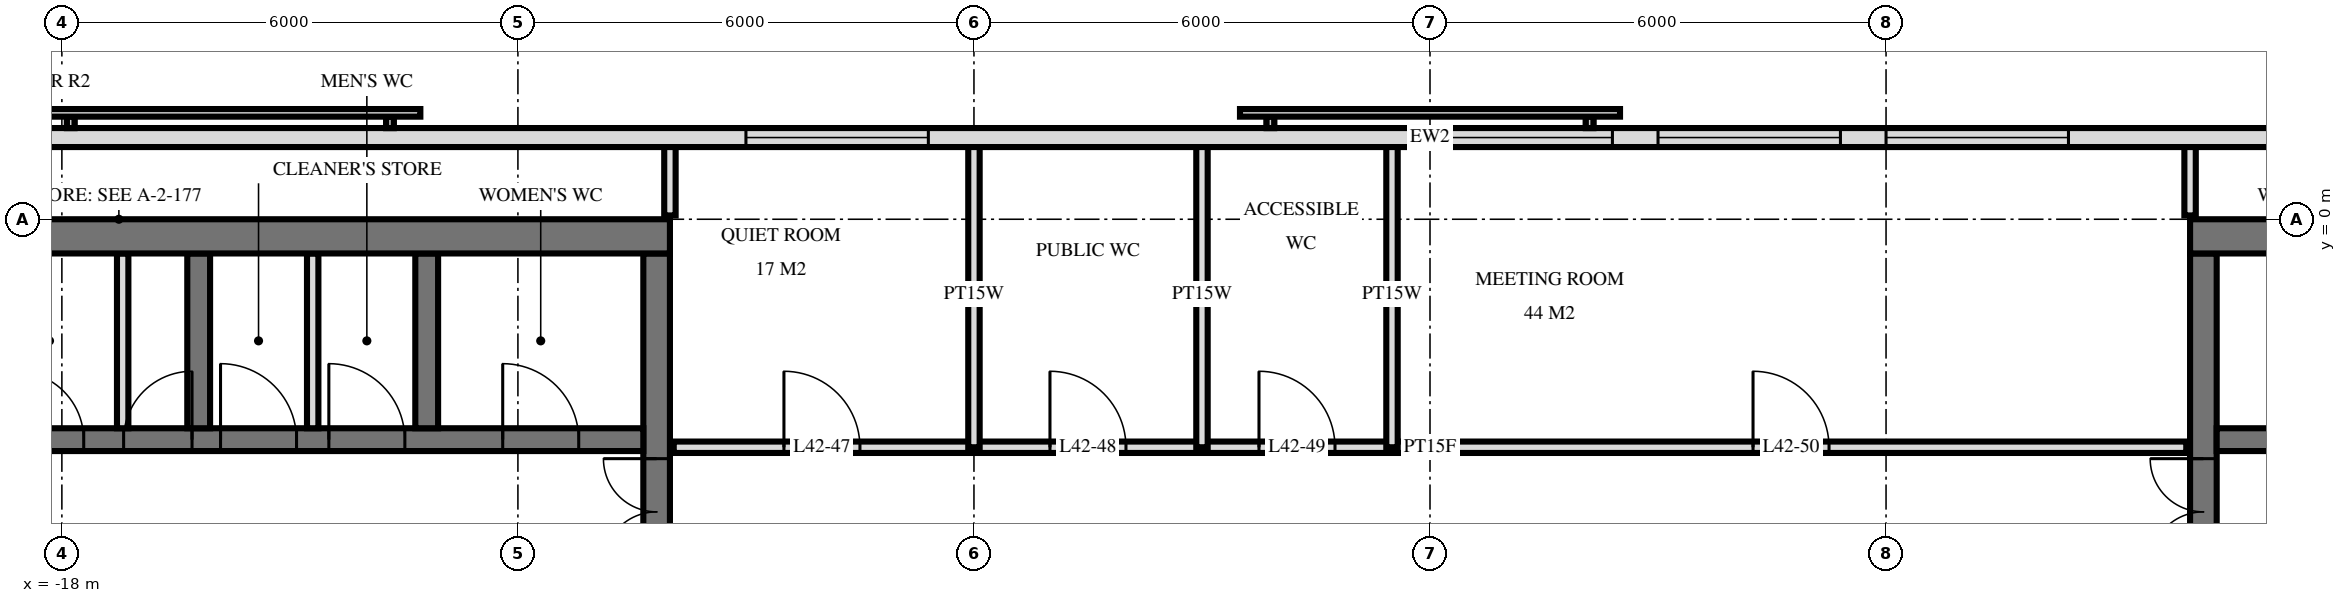
"""IFC4 building model, lengths in metres.
Left out: names, types, materials, properties, quantities, classifications, styles, units other than length and angle.
Written with IfcOpenShell. Run it as: python <this file> out.ifc"""

import sys

from ifc_helpers import new_model, si_unit, direction, frame, frame_2d, origin, place, context, subcontext, project, spatial, rectangle, extrude, element, fill, save


model = new_model("IFC4")
c1 = context("Model", 3, precision=1e-05, world=origin(), true_north=direction((0.0, 1.0)))
c2 = subcontext(c1, "Body", "Model", "MODEL_VIEW")
j1 = project(units=[si_unit("LENGTHUNIT", "METRE"), si_unit("PLANEANGLEUNIT", "RADIAN")], contexts=[c1])
p1 = place(None, origin())
s1 = spatial("IfcSite", under=j1, at=p1, CompositionType="ELEMENT")
p2 = place(p1, origin())
s2 = spatial("IfcBuilding", under=s1, at=p2, CompositionType="ELEMENT")
p3 = place(p2, frame((0.0, 0.0, 163.2)))
s3 = spatial("IfcBuildingStorey", under=s2, at=p3, CompositionType="ELEMENT", Elevation=163.2)
p4 = place(p3, frame((-24.5, -0.225, 0.0), z_axis=(0.0, 0.0, 1.0), x_axis=(1.0, 0.0, 0.0)))
e1 = element("IfcWall", 1, at=p4, inside=s3, PredefinedType="SHEAR", context=c2, shape_type="SweptSolid", body=[
    extrude(rectangle(XDim=14.5, YDim=0.45, at=frame_2d((7.25, 0.0))), origin(), (0.0, 0.0, 1.0), 3.6),
])
p5 = place(p3, frame((-10.175, -14.55, 0.0), z_axis=(0.0, 0.0, 1.0), x_axis=(0.0, 1.0, 0.0)))
e2 = element("IfcWall", 2, at=p5, inside=s3, PredefinedType="SHEAR", context=c2, shape_type="SweptSolid", body=[
    extrude(rectangle(XDim=14.1, YDim=0.35, at=frame_2d((7.05, 0.0))), origin(), (0.0, 0.0, 1.0), 3.6),
])
p6 = place(p5, frame((8.4, 0.0, 0.0)))
e3 = element("IfcOpeningElement", 3, at=p6, cuts=e2, PredefinedType="OPENING", context=c2, shape_type="SweptSolid", body=[
    extrude(rectangle(XDim=1.4, YDim=2.4, at=frame_2d((0.7, 1.2))), frame((0.0, 0.185, 0.0), z_axis=(0.0, -1.0, 0.0), x_axis=(1.0, 0.0, 0.0)), (0.0, 0.0, 1.0), 0.37),
])
p7 = place(p5, frame((10.0, 0.0, 0.0)))
e4 = element("IfcOpeningElement", 4, at=p7, cuts=e2, PredefinedType="OPENING", context=c2, shape_type="SweptSolid", body=[
    extrude(rectangle(XDim=1.4, YDim=2.4, at=frame_2d((0.7, 1.2))), frame((0.0, 0.185, 0.0), z_axis=(0.0, -1.0, 0.0), x_axis=(1.0, 0.0, 0.0)), (0.0, 0.0, 1.0), 0.37),
])
p8 = place(p5, frame((4.0, 0.0, 0.0)))
e5 = element("IfcOpeningElement", 5, at=p8, cuts=e2, PredefinedType="OPENING", context=c2, shape_type="SweptSolid", body=[
    extrude(rectangle(XDim=1.2, YDim=2.1, at=frame_2d((0.6, 1.05))), frame((0.0, 0.185, 0.0), z_axis=(0.0, -1.0, 0.0), x_axis=(1.0, 0.0, 0.0)), (0.0, 0.0, 1.0), 0.37),
])
p9 = place(p3, frame((-24.05, -2.9, 0.0), z_axis=(0.0, 0.0, 1.0), x_axis=(1.0, 0.0, 0.0)))
e6 = element("IfcWall", 6, at=p9, inside=s3, PredefinedType="SHEAR", context=c2, shape_type="SweptSolid", body=[
    extrude(rectangle(XDim=13.7, YDim=0.3, at=frame_2d((6.85, 0.0))), origin(), (0.0, 0.0, 1.0), 3.6),
])
p10 = place(p9, frame((0.55, 0.0, 0.0)))
e7 = element("IfcOpeningElement", 7, at=p10, cuts=e6, PredefinedType="OPENING", context=c2, shape_type="SweptSolid", body=[
    extrude(rectangle(XDim=1.1, YDim=2.1, at=frame_2d((0.55, 1.05))), frame((0.0, 0.16, 0.0), z_axis=(0.0, -1.0, 0.0), x_axis=(1.0, 0.0, 0.0)), (0.0, 0.0, 1.0), 0.32),
])
p11 = place(p9, frame((6.863, 0.0, 0.0)))
e8 = element("IfcOpeningElement", 8, at=p11, cuts=e6, PredefinedType="OPENING", context=c2, shape_type="SweptSolid", body=[
    extrude(rectangle(XDim=0.9, YDim=2.1, at=frame_2d((0.45, 1.05))), frame((0.0, 0.16, 0.0), z_axis=(0.0, -1.0, 0.0), x_axis=(1.0, 0.0, 0.0)), (0.0, 0.0, 1.0), 0.32),
])
p12 = place(p9, frame((5.438, 0.0, 0.0)))
e9 = element("IfcOpeningElement", 9, at=p12, cuts=e6, PredefinedType="OPENING", context=c2, shape_type="SweptSolid", body=[
    extrude(rectangle(XDim=0.9, YDim=2.1, at=frame_2d((0.45, 1.05))), frame((0.0, 0.16, 0.0), z_axis=(0.0, -1.0, 0.0), x_axis=(1.0, 0.0, 0.0)), (0.0, 0.0, 1.0), 0.32),
])
p13 = place(p9, frame((11.85, 0.0, 0.0)))
e10 = element("IfcOpeningElement", 10, at=p13, cuts=e6, PredefinedType="OPENING", context=c2, shape_type="SweptSolid", body=[
    extrude(rectangle(XDim=1.0, YDim=2.1, at=frame_2d((0.5, 1.05))), frame((0.0, 0.16, 0.0), z_axis=(0.0, -1.0, 0.0), x_axis=(1.0, 0.0, 0.0)), (0.0, 0.0, 1.0), 0.32),
])
p14 = place(p9, frame((9.562, 0.0, 0.0)))
e11 = element("IfcOpeningElement", 11, at=p14, cuts=e6, PredefinedType="OPENING", context=c2, shape_type="SweptSolid", body=[
    extrude(rectangle(XDim=1.0, YDim=2.1, at=frame_2d((0.5, 1.05))), frame((0.0, 0.16, 0.0), z_axis=(0.0, -1.0, 0.0), x_axis=(1.0, 0.0, 0.0)), (0.0, 0.0, 1.0), 0.32),
])
p15 = place(p9, frame((8.137, 0.0, 0.0)))
e12 = element("IfcOpeningElement", 12, at=p15, cuts=e6, PredefinedType="OPENING", context=c2, shape_type="SweptSolid", body=[
    extrude(rectangle(XDim=1.0, YDim=2.1, at=frame_2d((0.5, 1.05))), frame((0.0, 0.16, 0.0), z_axis=(0.0, -1.0, 0.0), x_axis=(1.0, 0.0, 0.0)), (0.0, 0.0, 1.0), 0.32),
])
p16 = place(p9, frame((3.0, 0.0, 0.0)))
e13 = element("IfcOpeningElement", 13, at=p16, cuts=e6, PredefinedType="OPENING", context=c2, shape_type="SweptSolid", body=[
    extrude(rectangle(XDim=1.0, YDim=2.1, at=frame_2d((0.5, 1.05))), frame((0.0, 0.16, 0.0), z_axis=(0.0, -1.0, 0.0), x_axis=(1.0, 0.0, 0.0)), (0.0, 0.0, 1.0), 0.32),
])
for number, where, z_axis, x_axis in (
    (14, (-13.2, -2.75, 0.0), (0.0, 0.0, 1.0), (0.0, 1.0, 0.0)),
    (15, (-16.2, -2.75, 0.0), (0.0, 0.0, 1.0), (0.0, 1.0, 0.0)),
):
    element("IfcWall", number, at=place(p3, frame(where, z_axis=z_axis, x_axis=x_axis)), inside=s3, PredefinedType="SHEAR", context=c2, shape_type="SweptSolid", body=[
        extrude(rectangle(XDim=2.3, YDim=0.3, at=frame_2d((1.15, 0.0))), origin(), (0.0, 0.0, 1.0), 3.6),
    ])
p17 = place(p3, frame((10.0, -0.225, 0.0), z_axis=(0.0, 0.0, 1.0), x_axis=(1.0, 0.0, 0.0)))
e16 = element("IfcWall", 16, at=p17, inside=s3, PredefinedType="SHEAR", context=c2, shape_type="SweptSolid", body=[
    extrude(rectangle(XDim=14.5, YDim=0.45, at=frame_2d((7.25, 0.0))), origin(), (0.0, 0.0, 1.0), 3.6),
])
p18 = place(p3, frame((10.175, -14.55, 0.0), z_axis=(0.0, 0.0, 1.0), x_axis=(0.0, 1.0, 0.0)))
e17 = element("IfcWall", 17, at=p18, inside=s3, PredefinedType="SHEAR", context=c2, shape_type="SweptSolid", body=[
    extrude(rectangle(XDim=14.1, YDim=0.35, at=frame_2d((7.05, 0.0))), origin(), (0.0, 0.0, 1.0), 3.6),
])
p19 = place(p18, frame((8.4, 0.0, 0.0)))
e18 = element("IfcOpeningElement", 18, at=p19, cuts=e17, PredefinedType="OPENING", context=c2, shape_type="SweptSolid", body=[
    extrude(rectangle(XDim=1.4, YDim=2.4, at=frame_2d((0.7, 1.2))), frame((0.0, 0.185, 0.0), z_axis=(0.0, -1.0, 0.0), x_axis=(1.0, 0.0, 0.0)), (0.0, 0.0, 1.0), 0.37),
])
p20 = place(p18, frame((10.0, 0.0, 0.0)))
e19 = element("IfcOpeningElement", 19, at=p20, cuts=e17, PredefinedType="OPENING", context=c2, shape_type="SweptSolid", body=[
    extrude(rectangle(XDim=1.4, YDim=2.4, at=frame_2d((0.7, 1.2))), frame((0.0, 0.185, 0.0), z_axis=(0.0, -1.0, 0.0), x_axis=(1.0, 0.0, 0.0)), (0.0, 0.0, 1.0), 0.37),
])
p21 = place(p18, frame((4.0, 0.0, 0.0)))
e20 = element("IfcOpeningElement", 20, at=p21, cuts=e17, PredefinedType="OPENING", context=c2, shape_type="SweptSolid", body=[
    extrude(rectangle(XDim=1.2, YDim=2.1, at=frame_2d((0.6, 1.05))), frame((0.0, 0.185, 0.0), z_axis=(0.0, -1.0, 0.0), x_axis=(1.0, 0.0, 0.0)), (0.0, 0.0, 1.0), 0.37),
])
p22 = place(p3, frame((10.35, -2.9, 0.0), z_axis=(0.0, 0.0, 1.0), x_axis=(1.0, 0.0, 0.0)))
e21 = element("IfcWall", 21, at=p22, inside=s3, PredefinedType="SHEAR", context=c2, shape_type="SweptSolid", body=[
    extrude(rectangle(XDim=13.7, YDim=0.3, at=frame_2d((6.85, 0.0))), origin(), (0.0, 0.0, 1.0), 3.6),
])
p23 = place(p22, frame((12.05, 0.0, 0.0)))
e22 = element("IfcOpeningElement", 22, at=p23, cuts=e21, PredefinedType="OPENING", context=c2, shape_type="SweptSolid", body=[
    extrude(rectangle(XDim=1.1, YDim=2.1, at=frame_2d((0.55, 1.05))), frame((0.0, 0.16, 0.0), z_axis=(0.0, -1.0, 0.0), x_axis=(1.0, 0.0, 0.0)), (0.0, 0.0, 1.0), 0.32),
])
p24 = place(p22, frame((5.938, 0.0, 0.0)))
e23 = element("IfcOpeningElement", 23, at=p24, cuts=e21, PredefinedType="OPENING", context=c2, shape_type="SweptSolid", body=[
    extrude(rectangle(XDim=0.9, YDim=2.1, at=frame_2d((0.45, 1.05))), frame((0.0, 0.16, 0.0), z_axis=(0.0, -1.0, 0.0), x_axis=(1.0, 0.0, 0.0)), (0.0, 0.0, 1.0), 0.32),
])
p25 = place(p22, frame((7.363, 0.0, 0.0)))
e24 = element("IfcOpeningElement", 24, at=p25, cuts=e21, PredefinedType="OPENING", context=c2, shape_type="SweptSolid", body=[
    extrude(rectangle(XDim=0.9, YDim=2.1, at=frame_2d((0.45, 1.05))), frame((0.0, 0.16, 0.0), z_axis=(0.0, -1.0, 0.0), x_axis=(1.0, 0.0, 0.0)), (0.0, 0.0, 1.0), 0.32),
])
p26 = place(p22, frame((0.85, 0.0, 0.0)))
e25 = element("IfcOpeningElement", 25, at=p26, cuts=e21, PredefinedType="OPENING", context=c2, shape_type="SweptSolid", body=[
    extrude(rectangle(XDim=1.0, YDim=2.1, at=frame_2d((0.5, 1.05))), frame((0.0, 0.16, 0.0), z_axis=(0.0, -1.0, 0.0), x_axis=(1.0, 0.0, 0.0)), (0.0, 0.0, 1.0), 0.32),
])
p27 = place(p22, frame((3.137, 0.0, 0.0)))
e26 = element("IfcOpeningElement", 26, at=p27, cuts=e21, PredefinedType="OPENING", context=c2, shape_type="SweptSolid", body=[
    extrude(rectangle(XDim=1.0, YDim=2.1, at=frame_2d((0.5, 1.05))), frame((0.0, 0.16, 0.0), z_axis=(0.0, -1.0, 0.0), x_axis=(1.0, 0.0, 0.0)), (0.0, 0.0, 1.0), 0.32),
])
p28 = place(p22, frame((4.562, 0.0, 0.0)))
e27 = element("IfcOpeningElement", 27, at=p28, cuts=e21, PredefinedType="OPENING", context=c2, shape_type="SweptSolid", body=[
    extrude(rectangle(XDim=1.0, YDim=2.1, at=frame_2d((0.5, 1.05))), frame((0.0, 0.16, 0.0), z_axis=(0.0, -1.0, 0.0), x_axis=(1.0, 0.0, 0.0)), (0.0, 0.0, 1.0), 0.32),
])
p29 = place(p22, frame((9.7, 0.0, 0.0)))
e28 = element("IfcOpeningElement", 28, at=p29, cuts=e21, PredefinedType="OPENING", context=c2, shape_type="SweptSolid", body=[
    extrude(rectangle(XDim=1.0, YDim=2.1, at=frame_2d((0.5, 1.05))), frame((0.0, 0.16, 0.0), z_axis=(0.0, -1.0, 0.0), x_axis=(1.0, 0.0, 0.0)), (0.0, 0.0, 1.0), 0.32),
])
p30 = place(p3, frame((23.675, 1.075, 0.0), z_axis=(0.0, 0.0, 1.0), x_axis=(-1.0, 0.0, 0.0)))
e29 = element("IfcWall", 29, at=p30, inside=s3, PredefinedType="SOLIDWALL", context=c2, shape_type="SweptSolid", body=[
    extrude(rectangle(XDim=47.351, YDim=0.25, at=frame_2d((23.675, 0.0))), origin(), (0.0, 0.0, 1.0), 3.32),
])
p31 = place(p30, frame((15.275, 0.0, 0.3)))
e30 = element("IfcOpeningElement", 30, at=p31, cuts=e29, PredefinedType="OPENING", context=c2, shape_type="SweptSolid", body=[
    extrude(rectangle(XDim=2.4, YDim=2.1, at=frame_2d((1.2, 1.05))), frame((0.0, 0.135, 0.0), z_axis=(0.0, -1.0, 0.0), x_axis=(1.0, 0.0, 0.0)), (0.0, 0.0, 1.0), 0.27),
])
p32 = place(p30, frame((18.275, 0.0, 0.3)))
e31 = element("IfcOpeningElement", 31, at=p32, cuts=e29, PredefinedType="OPENING", context=c2, shape_type="SweptSolid", body=[
    extrude(rectangle(XDim=2.4, YDim=2.1, at=frame_2d((1.2, 1.05))), frame((0.0, 0.135, 0.0), z_axis=(0.0, -1.0, 0.0), x_axis=(1.0, 0.0, 0.0)), (0.0, 0.0, 1.0), 0.27),
])
p33 = place(p30, frame((21.275, 0.0, 0.3)))
e32 = element("IfcOpeningElement", 32, at=p33, cuts=e29, PredefinedType="OPENING", context=c2, shape_type="SweptSolid", body=[
    extrude(rectangle(XDim=2.4, YDim=2.1, at=frame_2d((1.2, 1.05))), frame((0.0, 0.135, 0.0), z_axis=(0.0, -1.0, 0.0), x_axis=(1.0, 0.0, 0.0)), (0.0, 0.0, 1.0), 0.27),
])
p34 = place(p30, frame((30.275, 0.0, 0.3)))
e33 = element("IfcOpeningElement", 33, at=p34, cuts=e29, PredefinedType="OPENING", context=c2, shape_type="SweptSolid", body=[
    extrude(rectangle(XDim=2.4, YDim=2.1, at=frame_2d((1.2, 1.05))), frame((0.0, 0.135, 0.0), z_axis=(0.0, -1.0, 0.0), x_axis=(1.0, 0.0, 0.0)), (0.0, 0.0, 1.0), 0.27),
])
for number, where, z_axis, x_axis in (
    (34, (-17.2, -2.75, 0.0), (0.0, 0.0, 1.0), (0.0, 1.0, 0.0)),
    (35, (-14.7, -2.75, 0.0), (0.0, 0.0, 1.0), (0.0, 1.0, 0.0)),
):
    element("IfcWall", number, at=place(p3, frame(where, z_axis=z_axis, x_axis=x_axis)), inside=s3, PredefinedType="PARTITIONING", context=c2, shape_type="SweptSolid", body=[
        extrude(rectangle(XDim=2.3, YDim=0.15, at=frame_2d((1.15, 0.0))), origin(), (0.0, 0.0, 1.0), 3.3),
    ])
p35 = place(p3, frame((10.0, 0.05, 0.0), z_axis=(0.0, 0.0, 1.0), x_axis=(0.0, 1.0, 0.0)))
e36 = element("IfcWall", 36, at=p35, inside=s3, PredefinedType="PARTITIONING", context=c2, shape_type="SweptSolid", body=[
    extrude(rectangle(XDim=0.97, YDim=0.15, at=frame_2d((0.485, 0.0))), origin(), (0.0, 0.0, 1.0), 3.32),
])
for number, where, z_axis, x_axis in (
    (37, (-0.5, -3.0, 0.0), (0.0, 0.0, 1.0), (0.0, 1.0, 0.0)),
    (38, (-3.0, -3.0, 0.0), (0.0, 0.0, 1.0), (0.0, 1.0, 0.0)),
    (39, (-6.0, -3.0, 0.0), (0.0, 0.0, 1.0), (0.0, 1.0, 0.0)),
):
    element("IfcWall", number, at=place(p3, frame(where, z_axis=z_axis, x_axis=x_axis)), inside=s3, PredefinedType="PLUMBINGWALL", context=c2, shape_type="SweptSolid", body=[
        extrude(rectangle(XDim=4.02, YDim=0.15, at=frame_2d((2.01, 0.0))), origin(), (0.0, 0.0, 1.0), 3.32),
    ])
p36 = place(p3, frame((-10.0, 0.05, 0.0), z_axis=(0.0, 0.0, 1.0), x_axis=(0.0, 1.0, 0.0)))
e40 = element("IfcWall", 40, at=p36, inside=s3, PredefinedType="PARTITIONING", context=c2, shape_type="SweptSolid", body=[
    extrude(rectangle(XDim=0.97, YDim=0.15, at=frame_2d((0.485, 0.0))), origin(), (0.0, 0.0, 1.0), 3.32),
])
p37 = place(p3, frame((-9.95, -3.0, 0.0), z_axis=(0.0, 0.0, 1.0), x_axis=(1.0, 0.0, 0.0)))
e41 = element("IfcWall", 41, at=p37, inside=s3, PredefinedType="PARTITIONING", context=c2, shape_type="SweptSolid", body=[
    extrude(rectangle(XDim=19.9, YDim=0.15, at=frame_2d((9.95, 0.0))), origin(), (0.0, 0.0, 1.0), 3.32),
])
p38 = place(p37, frame((1.45, 0.0, 0.0)))
e42 = element("IfcOpeningElement", 42, at=p38, cuts=e41, PredefinedType="OPENING", context=c2, shape_type="SweptSolid", body=[
    extrude(rectangle(XDim=1.0, YDim=2.1, at=frame_2d((0.5, 1.05))), frame((0.0, 0.085, 0.0), z_axis=(0.0, -1.0, 0.0), x_axis=(1.0, 0.0, 0.0)), (0.0, 0.0, 1.0), 0.17),
])
p39 = place(p37, frame((4.95, 0.0, 0.0)))
e43 = element("IfcOpeningElement", 43, at=p39, cuts=e41, PredefinedType="OPENING", context=c2, shape_type="SweptSolid", body=[
    extrude(rectangle(XDim=1.0, YDim=2.1, at=frame_2d((0.5, 1.05))), frame((0.0, 0.085, 0.0), z_axis=(0.0, -1.0, 0.0), x_axis=(1.0, 0.0, 0.0)), (0.0, 0.0, 1.0), 0.17),
])
p40 = place(p37, frame((7.7, 0.0, 0.0)))
e44 = element("IfcOpeningElement", 44, at=p40, cuts=e41, PredefinedType="OPENING", context=c2, shape_type="SweptSolid", body=[
    extrude(rectangle(XDim=1.0, YDim=2.1, at=frame_2d((0.5, 1.05))), frame((0.0, 0.085, 0.0), z_axis=(0.0, -1.0, 0.0), x_axis=(1.0, 0.0, 0.0)), (0.0, 0.0, 1.0), 0.17),
])
p41 = place(p37, frame((14.2, 0.0, 0.0)))
e45 = element("IfcOpeningElement", 45, at=p41, cuts=e41, PredefinedType="OPENING", context=c2, shape_type="SweptSolid", body=[
    extrude(rectangle(XDim=1.0, YDim=2.1, at=frame_2d((0.5, 1.05))), frame((0.0, 0.085, 0.0), z_axis=(0.0, -1.0, 0.0), x_axis=(1.0, 0.0, 0.0)), (0.0, 0.0, 1.0), 0.17),
])
p42 = place(p31, origin())
e46 = element("IfcWindow", 46, at=p42, inside=s3, PartitioningType="SINGLE_PANEL", PredefinedType="WINDOW", context=c2, shape_type="SweptSolid", body=[
    extrude(rectangle(XDim=2.4, YDim=2.1, at=frame_2d((1.2, 1.05))), frame((0.0, 0.03, 0.0), z_axis=(0.0, -1.0, 0.0), x_axis=(1.0, 0.0, 0.0)), (0.0, 0.0, 1.0), 0.06),
])
fill(e30, e46)
p43 = place(p32, origin())
e47 = element("IfcWindow", 47, at=p43, inside=s3, PartitioningType="SINGLE_PANEL", PredefinedType="WINDOW", context=c2, shape_type="SweptSolid", body=[
    extrude(rectangle(XDim=2.4, YDim=2.1, at=frame_2d((1.2, 1.05))), frame((0.0, 0.03, 0.0), z_axis=(0.0, -1.0, 0.0), x_axis=(1.0, 0.0, 0.0)), (0.0, 0.0, 1.0), 0.06),
])
fill(e31, e47)
p44 = place(p33, origin())
e48 = element("IfcWindow", 48, at=p44, inside=s3, PartitioningType="SINGLE_PANEL", PredefinedType="WINDOW", context=c2, shape_type="SweptSolid", body=[
    extrude(rectangle(XDim=2.4, YDim=2.1, at=frame_2d((1.2, 1.05))), frame((0.0, 0.03, 0.0), z_axis=(0.0, -1.0, 0.0), x_axis=(1.0, 0.0, 0.0)), (0.0, 0.0, 1.0), 0.06),
])
fill(e32, e48)
p45 = place(p34, origin())
e49 = element("IfcWindow", 49, at=p45, inside=s3, PartitioningType="SINGLE_PANEL", PredefinedType="WINDOW", context=c2, shape_type="SweptSolid", body=[
    extrude(rectangle(XDim=2.4, YDim=2.1, at=frame_2d((1.2, 1.05))), frame((0.0, 0.03, 0.0), z_axis=(0.0, -1.0, 0.0), x_axis=(1.0, 0.0, 0.0)), (0.0, 0.0, 1.0), 0.06),
])
fill(e33, e49)
p46 = place(p7, origin())
e50 = element("IfcDoor", 50, at=p46, inside=s3, OperationType="DOUBLE_DOOR_SINGLE_SWING", PredefinedType="DOOR", context=c2, shape_type="SweptSolid", body=[
    extrude(rectangle(XDim=1.4, YDim=2.4, at=frame_2d((0.7, 1.2))), frame((0.0, 0.025, 0.0), z_axis=(0.0, -1.0, 0.0), x_axis=(1.0, 0.0, 0.0)), (0.0, 0.0, 1.0), 0.05),
])
fill(e4, e50)
p47 = place(p11, origin())
e51 = element("IfcDoor", 51, at=p47, inside=s3, OperationType="SINGLE_SWING_LEFT", PredefinedType="DOOR", context=c2, shape_type="SweptSolid", body=[
    extrude(rectangle(XDim=0.9, YDim=2.1, at=frame_2d((0.45, 1.05))), frame((0.0, 0.025, 0.0), z_axis=(0.0, -1.0, 0.0), x_axis=(1.0, 0.0, 0.0)), (0.0, 0.0, 1.0), 0.05),
])
fill(e8, e51)
p48 = place(p12, origin())
e52 = element("IfcDoor", 52, at=p48, inside=s3, OperationType="SINGLE_SWING_RIGHT", PredefinedType="DOOR", context=c2, shape_type="SweptSolid", body=[
    extrude(rectangle(XDim=0.9, YDim=2.1, at=frame_2d((0.45, 1.05))), frame((0.0, 0.025, 0.0), z_axis=(0.0, -1.0, 0.0), x_axis=(1.0, 0.0, 0.0)), (0.0, 0.0, 1.0), 0.05),
])
fill(e9, e52)
p49 = place(p13, origin())
e53 = element("IfcDoor", 53, at=p49, inside=s3, OperationType="SINGLE_SWING_RIGHT", PredefinedType="DOOR", context=c2, shape_type="SweptSolid", body=[
    extrude(rectangle(XDim=1.0, YDim=2.1, at=frame_2d((0.5, 1.05))), frame((0.0, 0.025, 0.0), z_axis=(0.0, -1.0, 0.0), x_axis=(1.0, 0.0, 0.0)), (0.0, 0.0, 1.0), 0.05),
])
fill(e10, e53)
p50 = place(p14, origin())
e54 = element("IfcDoor", 54, at=p50, inside=s3, OperationType="SINGLE_SWING_RIGHT", PredefinedType="DOOR", context=c2, shape_type="SweptSolid", body=[
    extrude(rectangle(XDim=1.0, YDim=2.1, at=frame_2d((0.5, 1.05))), frame((0.0, 0.025, 0.0), z_axis=(0.0, -1.0, 0.0), x_axis=(1.0, 0.0, 0.0)), (0.0, 0.0, 1.0), 0.05),
])
fill(e11, e54)
p51 = place(p15, origin())
e55 = element("IfcDoor", 55, at=p51, inside=s3, OperationType="SINGLE_SWING_RIGHT", PredefinedType="DOOR", context=c2, shape_type="SweptSolid", body=[
    extrude(rectangle(XDim=1.0, YDim=2.1, at=frame_2d((0.5, 1.05))), frame((0.0, 0.025, 0.0), z_axis=(0.0, -1.0, 0.0), x_axis=(1.0, 0.0, 0.0)), (0.0, 0.0, 1.0), 0.05),
])
fill(e12, e55)
p52 = place(p20, origin())
e56 = element("IfcDoor", 56, at=p52, inside=s3, OperationType="DOUBLE_DOOR_SINGLE_SWING", PredefinedType="DOOR", context=c2, shape_type="SweptSolid", body=[
    extrude(rectangle(XDim=1.4, YDim=2.4, at=frame_2d((0.7, 1.2))), frame((0.0, 0.025, 0.0), z_axis=(0.0, -1.0, 0.0), x_axis=(1.0, 0.0, 0.0)), (0.0, 0.0, 1.0), 0.05),
])
fill(e19, e56)
p53 = place(p38, origin())
e57 = element("IfcDoor", 57, at=p53, inside=s3, OperationType="SINGLE_SWING_RIGHT", PredefinedType="DOOR", context=c2, shape_type="SweptSolid", body=[
    extrude(rectangle(XDim=1.0, YDim=2.1, at=frame_2d((0.5, 1.05))), frame((0.0, 0.025, 0.0), z_axis=(0.0, -1.0, 0.0), x_axis=(1.0, 0.0, 0.0)), (0.0, 0.0, 1.0), 0.05),
])
fill(e42, e57)
p54 = place(p39, origin())
e58 = element("IfcDoor", 58, at=p54, inside=s3, OperationType="SINGLE_SWING_RIGHT", PredefinedType="DOOR", context=c2, shape_type="SweptSolid", body=[
    extrude(rectangle(XDim=1.0, YDim=2.1, at=frame_2d((0.5, 1.05))), frame((0.0, 0.025, 0.0), z_axis=(0.0, -1.0, 0.0), x_axis=(1.0, 0.0, 0.0)), (0.0, 0.0, 1.0), 0.05),
])
fill(e43, e58)
p55 = place(p40, origin())
e59 = element("IfcDoor", 59, at=p55, inside=s3, OperationType="SINGLE_SWING_RIGHT", PredefinedType="DOOR", context=c2, shape_type="SweptSolid", body=[
    extrude(rectangle(XDim=1.0, YDim=2.1, at=frame_2d((0.5, 1.05))), frame((0.0, 0.025, 0.0), z_axis=(0.0, -1.0, 0.0), x_axis=(1.0, 0.0, 0.0)), (0.0, 0.0, 1.0), 0.05),
])
fill(e44, e59)
p56 = place(p41, origin())
e60 = element("IfcDoor", 60, at=p56, inside=s3, OperationType="SINGLE_SWING_RIGHT", PredefinedType="DOOR", context=c2, shape_type="SweptSolid", body=[
    extrude(rectangle(XDim=1.0, YDim=2.1, at=frame_2d((0.5, 1.05))), frame((0.0, 0.025, 0.0), z_axis=(0.0, -1.0, 0.0), x_axis=(1.0, 0.0, 0.0)), (0.0, 0.0, 1.0), 0.05),
])
fill(e45, e60)
save(model, sys.argv[1])
